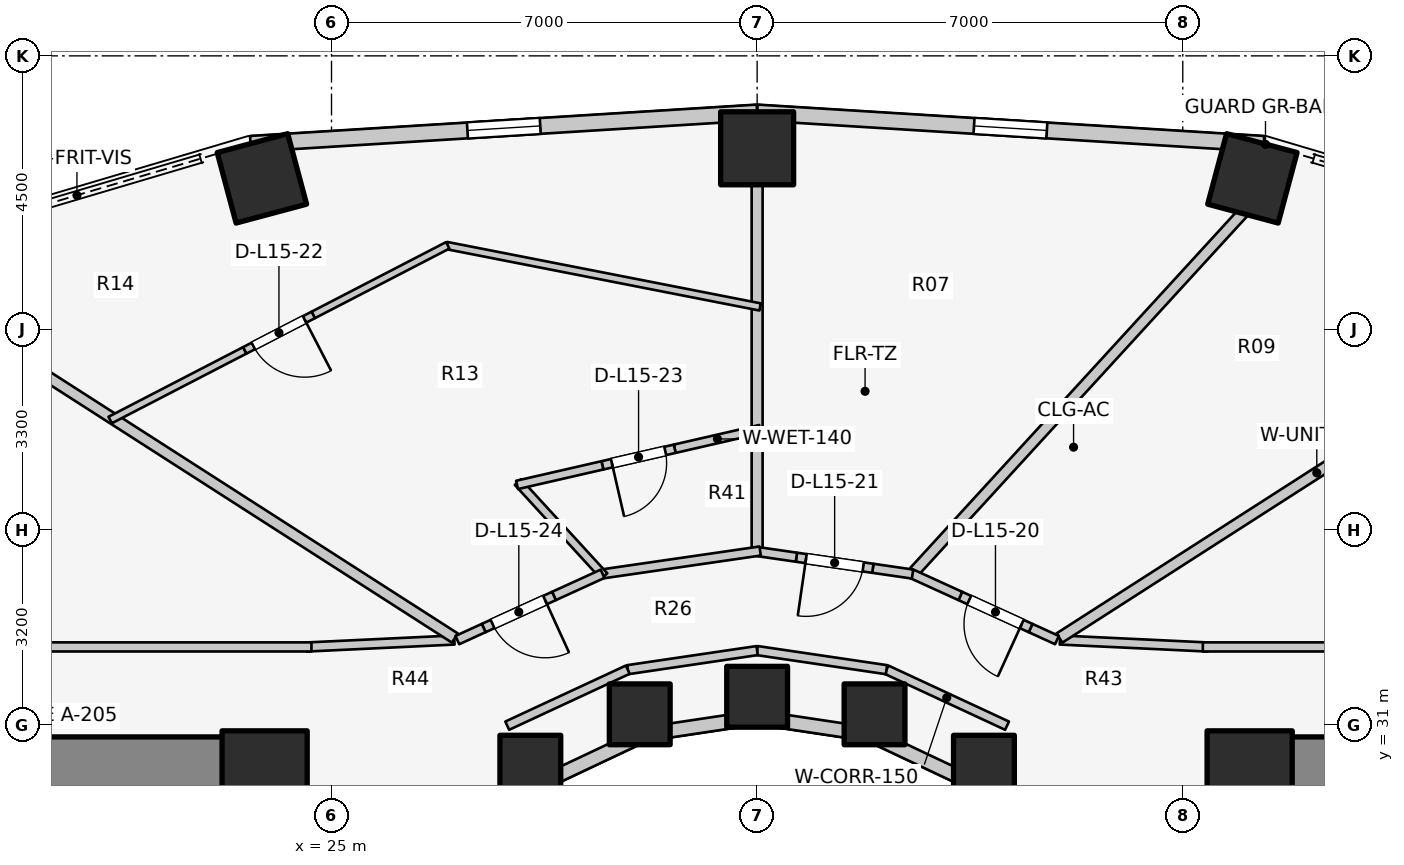
"""IFC4 building model, lengths in metres.
Left out: names, types, materials, properties, quantities, classifications, styles, units other than length and angle.
Written with IfcOpenShell. Run it as: python <this file> out.ifc"""

import sys

from ifc_helpers import new_model, si_unit, direction, frame, frame_2d, origin, origin_2d, place, context, subcontext, project, spatial, rectangle, extrude, element, fill, save


model = new_model("IFC4")
c1 = context("Model", 3, precision=1e-05, world=origin(), true_north=direction((0.0, 1.0)))
c2 = subcontext(c1, "Body", "Model", "MODEL_VIEW")
j1 = project(units=[si_unit("LENGTHUNIT", "METRE"), si_unit("PLANEANGLEUNIT", "RADIAN")], contexts=[c1])
p1 = place(None, origin())
s1 = spatial("IfcSite", under=j1, at=p1, CompositionType="ELEMENT")
p2 = place(p1, origin())
s2 = spatial("IfcBuilding", under=s1, at=p2, CompositionType="ELEMENT")
p3 = place(p2, frame((0.0, 0.0, 52.4)))
s3 = spatial("IfcBuildingStorey", under=s2, at=p3, CompositionType="ELEMENT", Elevation=52.4)
for number, where, z_axis, x_axis in (
    (1, (19.65, 30.35, 0.0), (0.0, 0.0, 1.0), (1.0, 0.0, 0.0)),
    (2, (39.85, 30.35, 0.0), (0.0, 0.0, 1.0), (1.0, 0.0, 0.0)),
):
    element("IfcWall", number, at=place(p3, frame(where, z_axis=z_axis, x_axis=x_axis)), inside=s3, PredefinedType="SHEAR", context=c2, shape_type="SweptSolid", body=[
        extrude(rectangle(XDim=4.5, YDim=0.9, at=frame_2d((2.25, 0.0))), origin(), (0.0, 0.0, 1.0), 3.1),
    ])
for number, where, z_axis, x_axis in (
    (3, (23.9, 30.2, 0.0), (0.0, 0.0, 1.0), (1.0, 0.0, 0.0)),
    (4, (40.1, 30.2, 0.0), (0.0, 0.0, 1.0), (1.0, 0.0, 0.0)),
):
    element("IfcColumn", number, at=place(p3, frame(where, z_axis=z_axis, x_axis=x_axis)), inside=s3, PredefinedType="COLUMN", context=c2, shape_type="SweptSolid", body=[
        extrude(rectangle(XDim=1.4, YDim=1.4, at=origin_2d()), origin(), (0.0, 0.0, 1.0), 3.1),
    ])
for number, where, z_axis, x_axis in (
    (5, (35.73, 30.327, 0.0), (0.0, 0.0, 1.0), (1.0, 0.0, 0.0)),
    (6, (33.931, 31.172, 0.0), (0.0, 0.0, 1.0), (1.0, 0.0, 0.0)),
):
    element("IfcColumn", number, at=place(p3, frame(where, z_axis=z_axis, x_axis=x_axis)), inside=s3, PredefinedType="COLUMN", context=c2, shape_type="SweptSolid", body=[
        extrude(rectangle(XDim=1.0, YDim=1.0, at=origin_2d()), origin(), (0.0, 0.0, 1.0), 3.1),
    ])
p4 = place(p3, frame((40.145, 39.986, 0.0), z_axis=(0.0, 0.0, 1.0), x_axis=(0.258819045103, 0.965925826289, 0.0)))
e7 = element("IfcColumn", 7, at=p4, inside=s3, PredefinedType="COLUMN", context=c2, shape_type="SweptSolid", body=[
    extrude(rectangle(XDim=1.2, YDim=1.2, at=origin_2d()), origin(), (0.0, 0.0, 1.0), 3.1),
])
p5 = place(p3, frame((32.0, 31.46, 0.0), z_axis=(0.0, 0.0, 1.0), x_axis=(1.0, 0.0, 0.0)))
e8 = element("IfcColumn", 8, at=p5, inside=s3, PredefinedType="COLUMN", context=c2, shape_type="SweptSolid", body=[
    extrude(rectangle(XDim=1.0, YDim=1.0, at=origin_2d()), origin(), (0.0, 0.0, 1.0), 3.1),
])
p6 = place(p3, frame((32.0, 40.48, 0.0), z_axis=(0.0, 0.0, 1.0), x_axis=(0.0, 1.0, 0.0)))
e9 = element("IfcColumn", 9, at=p6, inside=s3, PredefinedType="COLUMN", context=c2, shape_type="SweptSolid", body=[
    extrude(rectangle(XDim=1.2, YDim=1.2, at=origin_2d()), origin(), (0.0, 0.0, 1.0), 3.1),
])
p7 = place(p3, frame((30.069, 31.172, 0.0), z_axis=(0.0, 0.0, 1.0), x_axis=(1.0, 0.0, 0.0)))
e10 = element("IfcColumn", 10, at=p7, inside=s3, PredefinedType="COLUMN", context=c2, shape_type="SweptSolid", body=[
    extrude(rectangle(XDim=1.0, YDim=1.0, at=origin_2d()), origin(), (0.0, 0.0, 1.0), 3.1),
])
p8 = place(p3, frame((23.855, 39.986, 0.0), z_axis=(0.0, 0.0, 1.0), x_axis=(-0.258819045103, 0.965925826289, 0.0)))
e11 = element("IfcColumn", 11, at=p8, inside=s3, PredefinedType="COLUMN", context=c2, shape_type="SweptSolid", body=[
    extrude(rectangle(XDim=1.2, YDim=1.2, at=origin_2d()), origin(), (0.0, 0.0, 1.0), 3.1),
])
p9 = place(p3, frame((28.27, 30.327, 0.0), z_axis=(0.0, 0.0, 1.0), x_axis=(1.0, 0.0, 0.0)))
e12 = element("IfcColumn", 12, at=p9, inside=s3, PredefinedType="COLUMN", context=c2, shape_type="SweptSolid", body=[
    extrude(rectangle(XDim=1.0, YDim=1.0, at=origin_2d()), origin(), (0.0, 0.0, 1.0), 3.1),
])
p10 = place(p3, frame((37.035, 28.742, 0.0), z_axis=(0.0, 0.0, 1.0), x_axis=(-0.752576694707, 0.658504607869, 0.0)))
e13 = element("IfcWall", 13, at=p10, inside=s3, PredefinedType="STANDARD", context=c2, shape_type="SweptSolid", body=[
    extrude(rectangle(XDim=1.959, YDim=0.23, at=frame_2d((0.98, 0.0))), origin(), (0.0, 0.0, 1.0), 1.22),
])
p11 = place(p3, frame((35.56, 30.032, 0.0), z_axis=(0.0, 0.0, 1.0), x_axis=(-0.904179699603, 0.427152280606, 0.0)))
e14 = element("IfcWall", 14, at=p11, inside=s3, PredefinedType="STANDARD", context=c2, shape_type="SweptSolid", body=[
    extrude(rectangle(XDim=1.899, YDim=0.23, at=frame_2d((0.95, 0.0))), origin(), (0.0, 0.0, 1.0), 1.22),
])
for number, where, z_axis, x_axis in (
    (15, (33.843, 30.843, 0.0), (0.0, 0.0, 1.0), (-0.989, 0.149, 0.0)),
    (16, (32.0, 31.12, 0.0), (0.0, 0.0, 1.0), (-0.989, -0.149, 0.0)),
):
    element("IfcWall", number, at=place(p3, frame(where, z_axis=z_axis, x_axis=x_axis)), inside=s3, PredefinedType="STANDARD", context=c2, shape_type="SweptSolid", body=[
        extrude(rectangle(XDim=1.864, YDim=0.23, at=frame_2d((0.932, 0.0))), origin(), (0.0, 0.0, 1.0), 1.22),
    ])
p12 = place(p3, frame((30.157, 30.843, 0.0), z_axis=(0.0, 0.0, 1.0), x_axis=(-0.904179699603, -0.427152280606, 0.0)))
e17 = element("IfcWall", 17, at=p12, inside=s3, PredefinedType="STANDARD", context=c2, shape_type="SweptSolid", body=[
    extrude(rectangle(XDim=1.899, YDim=0.23, at=frame_2d((0.95, 0.0))), origin(), (0.0, 0.0, 1.0), 1.22),
])
p13 = place(p3, frame((28.44, 30.032, 0.0), z_axis=(0.0, 0.0, 1.0), x_axis=(-0.752576694707, -0.658504607869, 0.0)))
e18 = element("IfcWall", 18, at=p13, inside=s3, PredefinedType="STANDARD", context=c2, shape_type="SweptSolid", body=[
    extrude(rectangle(XDim=1.959, YDim=0.23, at=frame_2d((0.98, 0.0))), origin(), (0.0, 0.0, 1.0), 1.22),
])
p14 = place(p3, frame((40.332, 40.553, 0.0), z_axis=(0.0, 0.0, 1.0), x_axis=(-0.998090514779, 0.061768311519, 0.0)))
e19 = element("IfcWall", 19, at=p14, inside=s3, PredefinedType="STANDARD", context=c2, shape_type="SweptSolid", body=[
    extrude(rectangle(XDim=8.348, YDim=0.26, at=frame_2d((4.174, 0.0))), origin(), (0.0, 0.0, 1.0), 1.22),
])
p15 = place(p14, frame((3.574, 0.0, 0.15)))
e20 = element("IfcOpeningElement", 20, at=p15, cuts=e19, PredefinedType="OPENING", context=c2, shape_type="SweptSolid", body=[
    extrude(rectangle(XDim=1.2, YDim=0.9, at=frame_2d((0.6, 0.45))), frame((0.0, 0.14, 0.0), z_axis=(0.0, -1.0, 0.0), x_axis=(1.0, 0.0, 0.0)), (0.0, 0.0, 1.0), 0.28),
])
p16 = place(p3, frame((32.0, 41.069, 0.0), z_axis=(0.0, 0.0, 1.0), x_axis=(-0.998090514779, -0.061768311519, 0.0)))
e21 = element("IfcWall", 21, at=p16, inside=s3, PredefinedType="STANDARD", context=c2, shape_type="SweptSolid", body=[
    extrude(rectangle(XDim=8.348, YDim=0.26, at=frame_2d((4.174, 0.0))), origin(), (0.0, 0.0, 1.0), 1.22),
])
p17 = place(p16, frame((3.574, 0.0, 0.15)))
e22 = element("IfcOpeningElement", 22, at=p17, cuts=e21, PredefinedType="OPENING", context=c2, shape_type="SweptSolid", body=[
    extrude(rectangle(XDim=1.2, YDim=0.9, at=frame_2d((0.6, 0.45))), frame((0.0, 0.14, 0.0), z_axis=(0.0, -1.0, 0.0), x_axis=(1.0, 0.0, 0.0)), (0.0, 0.0, 1.0), 0.28),
])
p18 = place(p3, frame((36.11, 30.985, 0.0), z_axis=(0.0, 0.0, 1.0), x_axis=(-0.906943449489, 0.421252393975, 0.0)))
e23 = element("IfcWall", 23, at=p18, inside=s3, PredefinedType="PARTITIONING", context=c2, shape_type="SweptSolid", body=[
    extrude(rectangle(XDim=2.186, YDim=0.15, at=frame_2d((1.093, 0.0))), origin(), (0.0, 0.0, 1.0), 1.957),
])
for number, where, z_axis, x_axis in (
    (24, (34.127, 31.906, 0.0), (0.0, 0.0, 1.0), (-0.989, 0.146, 0.0)),
    (25, (32.0, 32.22, 0.0), (0.0, 0.0, 1.0), (-0.989, -0.146, 0.0)),
):
    element("IfcWall", number, at=place(p3, frame(where, z_axis=z_axis, x_axis=x_axis)), inside=s3, PredefinedType="PARTITIONING", context=c2, shape_type="SweptSolid", body=[
        extrude(rectangle(XDim=2.151, YDim=0.15, at=frame_2d((1.075, 0.0))), origin(), (0.0, 0.0, 1.0), 1.957),
    ])
p19 = place(p3, frame((29.873, 31.906, 0.0), z_axis=(0.0, 0.0, 1.0), x_axis=(-0.906943449489, -0.421252393975, 0.0)))
e26 = element("IfcWall", 26, at=p19, inside=s3, PredefinedType="PARTITIONING", context=c2, shape_type="SweptSolid", body=[
    extrude(rectangle(XDim=2.186, YDim=0.15, at=frame_2d((1.093, 0.0))), origin(), (0.0, 0.0, 1.0), 1.957),
])
p20 = place(p3, frame((36.98, 32.394, 0.0), z_axis=(0.0, 0.0, 1.0), x_axis=(0.998877427952, -0.047369651964, 0.0)))
e27 = element("IfcWall", 27, at=p20, inside=s3, PredefinedType="PARTITIONING", context=c2, shape_type="SweptSolid", body=[
    extrude(rectangle(XDim=2.433, YDim=0.15, at=frame_2d((1.216, 0.0))), origin(), (0.0, 0.0, 1.0), 1.957),
])
p21 = place(p3, frame((39.33, 32.28, 0.0), z_axis=(0.0, 0.0, 1.0), x_axis=(1.0, 0.0, 0.0)))
e28 = element("IfcWall", 28, at=p21, inside=s3, PredefinedType="PARTITIONING", context=c2, shape_type="SweptSolid", body=[
    extrude(rectangle(XDim=5.06, YDim=0.15, at=frame_2d((2.53, 0.0))), origin(), (0.0, 0.0, 1.0), 1.957),
])
p22 = place(p3, frame((27.02, 32.394, 0.0), z_axis=(0.0, 0.0, 1.0), x_axis=(-0.998877427952, -0.047369651964, 0.0)))
e29 = element("IfcWall", 29, at=p22, inside=s3, PredefinedType="PARTITIONING", context=c2, shape_type="SweptSolid", body=[
    extrude(rectangle(XDim=2.433, YDim=0.15, at=frame_2d((1.216, 0.0))), origin(), (0.0, 0.0, 1.0), 1.957),
])
p23 = place(p3, frame((19.51, 32.28, 0.0), z_axis=(0.0, 0.0, 1.0), x_axis=(1.0, 0.0, 0.0)))
e30 = element("IfcWall", 30, at=p23, inside=s3, PredefinedType="PARTITIONING", context=c2, shape_type="SweptSolid", body=[
    extrude(rectangle(XDim=5.16, YDim=0.15, at=frame_2d((2.58, 0.0))), origin(), (0.0, 0.0, 1.0), 1.957),
])
p24 = place(p3, frame((36.971, 32.426, 0.0), z_axis=(0.0, 0.0, 1.0), x_axis=(0.841689919529, 0.5399611832, 0.0)))
e31 = element("IfcWall", 31, at=p24, inside=s3, PredefinedType="PARTITIONING", context=c2, shape_type="SweptSolid", body=[
    extrude(rectangle(XDim=10.058, YDim=0.18, at=frame_2d((5.029, 0.0))), origin(), (0.0, 0.0, 1.0), 1.957),
])
p25 = place(p3, frame((34.586, 33.521, 0.0), z_axis=(0.0, 0.0, 1.0), x_axis=(0.675465011224, 0.737392038615, 0.0)))
e32 = element("IfcWall", 32, at=p25, inside=s3, PredefinedType="PARTITIONING", context=c2, shape_type="SweptSolid", body=[
    extrude(rectangle(XDim=8.007, YDim=0.18, at=frame_2d((4.003, 0.0))), origin(), (0.0, 0.0, 1.0), 1.957),
])
p26 = place(p3, frame((32.0, 33.905, 0.0), z_axis=(0.0, 0.0, 1.0), x_axis=(0.0, 1.0, 0.0)))
e33 = element("IfcWall", 33, at=p26, inside=s3, PredefinedType="PARTITIONING", context=c2, shape_type="SweptSolid", body=[
    extrude(rectangle(XDim=5.995, YDim=0.18, at=frame_2d((2.998, 0.0))), origin(), (0.0, 0.0, 1.0), 1.957),
])
p27 = place(p3, frame((27.029, 32.426, 0.0), z_axis=(0.0, 0.0, 1.0), x_axis=(-0.841689919529, 0.5399611832, 0.0)))
e34 = element("IfcWall", 34, at=p27, inside=s3, PredefinedType="PARTITIONING", context=c2, shape_type="SweptSolid", body=[
    extrude(rectangle(XDim=10.058, YDim=0.18, at=frame_2d((5.029, 0.0))), origin(), (0.0, 0.0, 1.0), 1.957),
])
p28 = place(p3, frame((36.931, 32.393, 0.0), z_axis=(0.0, 0.0, 1.0), x_axis=(-0.909645934478, 0.415384489224, 0.0)))
e35 = element("IfcWall", 35, at=p28, inside=s3, PredefinedType="PARTITIONING", context=c2, shape_type="SweptSolid", body=[
    extrude(rectangle(XDim=0.477, YDim=0.15, at=frame_2d((0.238, 0.0))), origin(), (0.0, 0.0, 1.0), 2.575),
])
p29 = place(p3, frame((36.497, 32.591, 0.0), z_axis=(0.0, 0.0, 1.0), x_axis=(-0.909812681416, 0.415019137794, 0.0)))
e36 = element("IfcWall", 36, at=p29, inside=s3, PredefinedType="PARTITIONING", context=c2, shape_type="SweptSolid", body=[
    extrude(rectangle(XDim=1.27, YDim=0.15, at=frame_2d((0.635, 0.0))), origin(), (0.0, 0.0, 1.0), 2.16),
])
p30 = place(p29, frame((0.16, 0.0, 0.0)))
e37 = element("IfcOpeningElement", 37, at=p30, cuts=e36, PredefinedType="OPENING", context=c2, shape_type="SweptSolid", body=[
    extrude(rectangle(XDim=0.95, YDim=2.1, at=frame_2d((0.475, 1.05))), frame((0.0, 0.085, 0.0), z_axis=(0.0, -1.0, 0.0), x_axis=(1.0, 0.0, 0.0)), (0.0, 0.0, 1.0), 0.17),
])
p31 = place(p3, frame((35.342, 33.118, 0.0), z_axis=(0.0, 0.0, 1.0), x_axis=(-0.909708546861, 0.415247347696, 0.0)))
e38 = element("IfcWall", 38, at=p31, inside=s3, PredefinedType="PARTITIONING", context=c2, shape_type="SweptSolid", body=[
    extrude(rectangle(XDim=0.878, YDim=0.15, at=frame_2d((0.439, 0.0))), origin(), (0.0, 0.0, 1.0), 1.957),
])
p32 = place(p3, frame((34.556, 33.478, 0.0), z_axis=(0.0, 0.0, 1.0), x_axis=(-0.989643848527, 0.143544603076, 0.0)))
e39 = element("IfcWall", 39, at=p32, inside=s3, PredefinedType="PARTITIONING", context=c2, shape_type="SweptSolid", body=[
    extrude(rectangle(XDim=0.66, YDim=0.15, at=frame_2d((0.33, 0.0))), origin(), (0.0, 0.0, 1.0), 2.575),
])
p33 = place(p3, frame((33.903, 33.573, 0.0), z_axis=(0.0, 0.0, 1.0), x_axis=(-0.989635669595, 0.143600980029, 0.0)))
e40 = element("IfcWall", 40, at=p33, inside=s3, PredefinedType="PARTITIONING", context=c2, shape_type="SweptSolid", body=[
    extrude(rectangle(XDim=1.27, YDim=0.15, at=frame_2d((0.635, 0.0))), origin(), (0.0, 0.0, 1.0), 2.575),
])
p34 = place(p33, frame((0.16, 0.0, 0.0)))
e41 = element("IfcOpeningElement", 41, at=p34, cuts=e40, PredefinedType="OPENING", context=c2, shape_type="SweptSolid", body=[
    extrude(rectangle(XDim=0.95, YDim=2.1, at=frame_2d((0.475, 1.05))), frame((0.0, 0.085, 0.0), z_axis=(0.0, -1.0, 0.0), x_axis=(1.0, 0.0, 0.0)), (0.0, 0.0, 1.0), 0.17),
])
p35 = place(p3, frame((32.646, 33.755, 0.0), z_axis=(0.0, 0.0, 1.0), x_axis=(-0.989636221287, 0.143597177958, 0.0)))
e42 = element("IfcWall", 42, at=p35, inside=s3, PredefinedType="PARTITIONING", context=c2, shape_type="SweptSolid", body=[
    extrude(rectangle(XDim=0.66, YDim=0.15, at=frame_2d((0.33, 0.0))), origin(), (0.0, 0.0, 1.0), 1.957),
])
p36 = place(p3, frame((32.049, 37.871, 0.0), z_axis=(0.0, 0.0, 1.0), x_axis=(-0.981343325718, 0.192263561471, 0.0)))
e43 = element("IfcWall", 43, at=p36, inside=s3, PredefinedType="MOVABLE", context=c2, shape_type="SweptSolid", body=[
    extrude(rectangle(XDim=5.255, YDim=0.12, at=frame_2d((2.627, 0.0))), origin(), (0.0, 0.0, 1.0), 1.957),
])
p37 = place(p3, frame((26.911, 38.884, 0.0), z_axis=(0.0, 0.0, 1.0), x_axis=(-0.888145903538, -0.459561588939, 0.0)))
e44 = element("IfcWall", 44, at=p37, inside=s3, PredefinedType="MOVABLE", context=c2, shape_type="SweptSolid", body=[
    extrude(rectangle(XDim=2.49, YDim=0.12, at=frame_2d((1.245, 0.0))), origin(), (0.0, 0.0, 1.0), 1.957),
])
p38 = place(p3, frame((24.699, 37.74, 0.0), z_axis=(0.0, 0.0, 1.0), x_axis=(-0.888190589687, -0.459475218474, 0.0)))
e45 = element("IfcWall", 45, at=p38, inside=s3, PredefinedType="MOVABLE", context=c2, shape_type="SweptSolid", body=[
    extrude(rectangle(XDim=1.27, YDim=0.12, at=frame_2d((0.635, 0.0))), origin(), (0.0, 0.0, 1.0), 2.575),
])
p39 = place(p38, frame((0.16, 0.0, 0.0)))
e46 = element("IfcOpeningElement", 46, at=p39, cuts=e45, PredefinedType="OPENING", context=c2, shape_type="SweptSolid", body=[
    extrude(rectangle(XDim=0.95, YDim=2.1, at=frame_2d((0.475, 1.05))), frame((0.0, 0.07, 0.0), z_axis=(0.0, -1.0, 0.0), x_axis=(1.0, 0.0, 0.0)), (0.0, 0.0, 1.0), 0.14),
])
p40 = place(p3, frame((23.572, 37.156, 0.0), z_axis=(0.0, 0.0, 1.0), x_axis=(-0.888145903538, -0.459561588939, 0.0)))
e47 = element("IfcWall", 47, at=p40, inside=s3, PredefinedType="MOVABLE", context=c2, shape_type="SweptSolid", body=[
    extrude(rectangle(XDim=2.49, YDim=0.12, at=frame_2d((1.245, 0.0))), origin(), (0.0, 0.0, 1.0), 1.957),
])
p41 = place(p3, frame((32.05, 33.857, 0.0), z_axis=(0.0, 0.0, 1.0), x_axis=(-0.989649898776, -0.143502884474, 0.0)))
e48 = element("IfcWall", 48, at=p41, inside=s3, PredefinedType="PARTITIONING", context=c2, shape_type="SweptSolid", body=[
    extrude(rectangle(XDim=2.676, YDim=0.15, at=frame_2d((1.338, 0.0))), origin(), (0.0, 0.0, 1.0), 1.957),
])
p42 = place(p3, frame((29.484, 33.443, 0.0), z_axis=(0.0, 0.0, 1.0), x_axis=(-0.675445566455, 0.737409849918, 0.0)))
e49 = element("IfcWall", 49, at=p42, inside=s3, PredefinedType="PLUMBINGWALL", context=c2, shape_type="SweptSolid", body=[
    extrude(rectangle(XDim=2.1, YDim=0.14, at=frame_2d((1.05, 0.0))), origin(), (0.0, 0.0, 1.0), 2.575),
])
p43 = place(p3, frame((32.049, 35.861, 0.0), z_axis=(0.0, 0.0, 1.0), x_axis=(-0.974701562934, -0.223510320151, 0.0)))
e50 = element("IfcWall", 50, at=p43, inside=s3, PredefinedType="PLUMBINGWALL", context=c2, shape_type="SweptSolid", body=[
    extrude(rectangle(XDim=1.441, YDim=0.14, at=frame_2d((0.72, 0.0))), origin(), (0.0, 0.0, 1.0), 1.957),
])
p44 = place(p3, frame((30.644, 35.539, 0.0), z_axis=(0.0, 0.0, 1.0), x_axis=(-0.97464691241, -0.223748510898, 0.0)))
e51 = element("IfcWall", 51, at=p44, inside=s3, PredefinedType="PLUMBINGWALL", context=c2, shape_type="SweptSolid", body=[
    extrude(rectangle(XDim=1.22, YDim=0.14, at=frame_2d((0.61, 0.0))), origin(), (0.0, 0.0, 1.0), 2.575),
])
p45 = place(p44, frame((0.16, 0.0, 0.0)))
e52 = element("IfcOpeningElement", 52, at=p45, cuts=e51, PredefinedType="OPENING", context=c2, shape_type="SweptSolid", body=[
    extrude(rectangle(XDim=0.9, YDim=2.1, at=frame_2d((0.45, 1.05))), frame((0.0, 0.08, 0.0), z_axis=(0.0, -1.0, 0.0), x_axis=(1.0, 0.0, 0.0)), (0.0, 0.0, 1.0), 0.16),
])
p46 = place(p3, frame((29.455, 35.266, 0.0), z_axis=(0.0, 0.0, 1.0), x_axis=(-0.97466463441, -0.223671299969, 0.0)))
e53 = element("IfcWall", 53, at=p46, inside=s3, PredefinedType="PLUMBINGWALL", context=c2, shape_type="SweptSolid", body=[
    extrude(rectangle(XDim=1.441, YDim=0.14, at=frame_2d((0.72, 0.0))), origin(), (0.0, 0.0, 1.0), 2.575),
])
p47 = place(p3, frame((29.457, 33.482, 0.0), z_axis=(0.0, 0.0, 1.0), x_axis=(-0.909708546861, -0.415247347696, 0.0)))
e54 = element("IfcWall", 54, at=p47, inside=s3, PredefinedType="PARTITIONING", context=c2, shape_type="SweptSolid", body=[
    extrude(rectangle(XDim=0.878, YDim=0.15, at=frame_2d((0.439, 0.0))), origin(), (0.0, 0.0, 1.0), 1.957),
])
p48 = place(p3, frame((28.658, 33.118, 0.0), z_axis=(0.0, 0.0, 1.0), x_axis=(-0.909812681416, -0.415019137794, 0.0)))
e55 = element("IfcWall", 55, at=p48, inside=s3, PredefinedType="PARTITIONING", context=c2, shape_type="SweptSolid", body=[
    extrude(rectangle(XDim=1.27, YDim=0.15, at=frame_2d((0.635, 0.0))), origin(), (0.0, 0.0, 1.0), 2.16),
])
p49 = place(p48, frame((0.16, 0.0, 0.0)))
e56 = element("IfcOpeningElement", 56, at=p49, cuts=e55, PredefinedType="OPENING", context=c2, shape_type="SweptSolid", body=[
    extrude(rectangle(XDim=0.95, YDim=2.1, at=frame_2d((0.475, 1.05))), frame((0.0, 0.085, 0.0), z_axis=(0.0, -1.0, 0.0), x_axis=(1.0, 0.0, 0.0)), (0.0, 0.0, 1.0), 0.17),
])
p50 = place(p3, frame((27.503, 32.591, 0.0), z_axis=(0.0, 0.0, 1.0), x_axis=(-0.909645934478, -0.415384489224, 0.0)))
e57 = element("IfcWall", 57, at=p50, inside=s3, PredefinedType="PARTITIONING", context=c2, shape_type="SweptSolid", body=[
    extrude(rectangle(XDim=0.477, YDim=0.15, at=frame_2d((0.238, 0.0))), origin(), (0.0, 0.0, 1.0), 2.575),
])
p51 = place(p15, origin())
e58 = element("IfcWindow", 58, at=p51, inside=s3, PartitioningType="SINGLE_PANEL", PredefinedType="WINDOW", context=c2, shape_type="SweptSolid", body=[
    extrude(rectangle(XDim=1.2, YDim=0.9, at=frame_2d((0.6, 0.45))), frame((0.0, 0.03, 0.0), z_axis=(0.0, -1.0, 0.0), x_axis=(1.0, 0.0, 0.0)), (0.0, 0.0, 1.0), 0.06),
])
fill(e20, e58)
p52 = place(p17, origin())
e59 = element("IfcWindow", 59, at=p52, inside=s3, PartitioningType="SINGLE_PANEL", PredefinedType="WINDOW", context=c2, shape_type="SweptSolid", body=[
    extrude(rectangle(XDim=1.2, YDim=0.9, at=frame_2d((0.6, 0.45))), frame((0.0, 0.03, 0.0), z_axis=(0.0, -1.0, 0.0), x_axis=(1.0, 0.0, 0.0)), (0.0, 0.0, 1.0), 0.06),
])
fill(e22, e59)
p53 = place(p30, origin())
e60 = element("IfcDoor", 60, at=p53, inside=s3, OperationType="SINGLE_SWING_LEFT", PredefinedType="DOOR", context=c2, shape_type="SweptSolid", body=[
    extrude(rectangle(XDim=0.95, YDim=2.1, at=frame_2d((0.475, 1.05))), frame((0.0, 0.025, 0.0), z_axis=(0.0, -1.0, 0.0), x_axis=(1.0, 0.0, 0.0)), (0.0, 0.0, 1.0), 0.05),
])
fill(e37, e60)
p54 = place(p34, origin())
e61 = element("IfcDoor", 61, at=p54, inside=s3, OperationType="SINGLE_SWING_RIGHT", PredefinedType="DOOR", context=c2, shape_type="SweptSolid", body=[
    extrude(rectangle(XDim=0.95, YDim=2.1, at=frame_2d((0.475, 1.05))), frame((0.0, 0.025, 0.0), z_axis=(0.0, -1.0, 0.0), x_axis=(1.0, 0.0, 0.0)), (0.0, 0.0, 1.0), 0.05),
])
fill(e41, e61)
p55 = place(p39, origin())
e62 = element("IfcDoor", 62, at=p55, inside=s3, OperationType="SINGLE_SWING_LEFT", PredefinedType="DOOR", context=c2, shape_type="SweptSolid", body=[
    extrude(rectangle(XDim=0.95, YDim=2.1, at=frame_2d((0.475, 1.05))), frame((0.0, 0.025, 0.0), z_axis=(0.0, -1.0, 0.0), x_axis=(1.0, 0.0, 0.0)), (0.0, 0.0, 1.0), 0.05),
])
fill(e46, e62)
p56 = place(p45, origin())
e63 = element("IfcDoor", 63, at=p56, inside=s3, OperationType="SINGLE_SWING_RIGHT", PredefinedType="DOOR", context=c2, shape_type="SweptSolid", body=[
    extrude(rectangle(XDim=0.9, YDim=2.1, at=frame_2d((0.45, 1.05))), frame((0.0, 0.025, 0.0), z_axis=(0.0, -1.0, 0.0), x_axis=(1.0, 0.0, 0.0)), (0.0, 0.0, 1.0), 0.05),
])
fill(e52, e63)
p57 = place(p49, origin())
e64 = element("IfcDoor", 64, at=p57, inside=s3, OperationType="SINGLE_SWING_LEFT", PredefinedType="DOOR", context=c2, shape_type="SweptSolid", body=[
    extrude(rectangle(XDim=0.95, YDim=2.1, at=frame_2d((0.475, 1.05))), frame((0.0, 0.025, 0.0), z_axis=(0.0, -1.0, 0.0), x_axis=(1.0, 0.0, 0.0)), (0.0, 0.0, 1.0), 0.05),
])
fill(e56, e64)
save(model, sys.argv[1])
